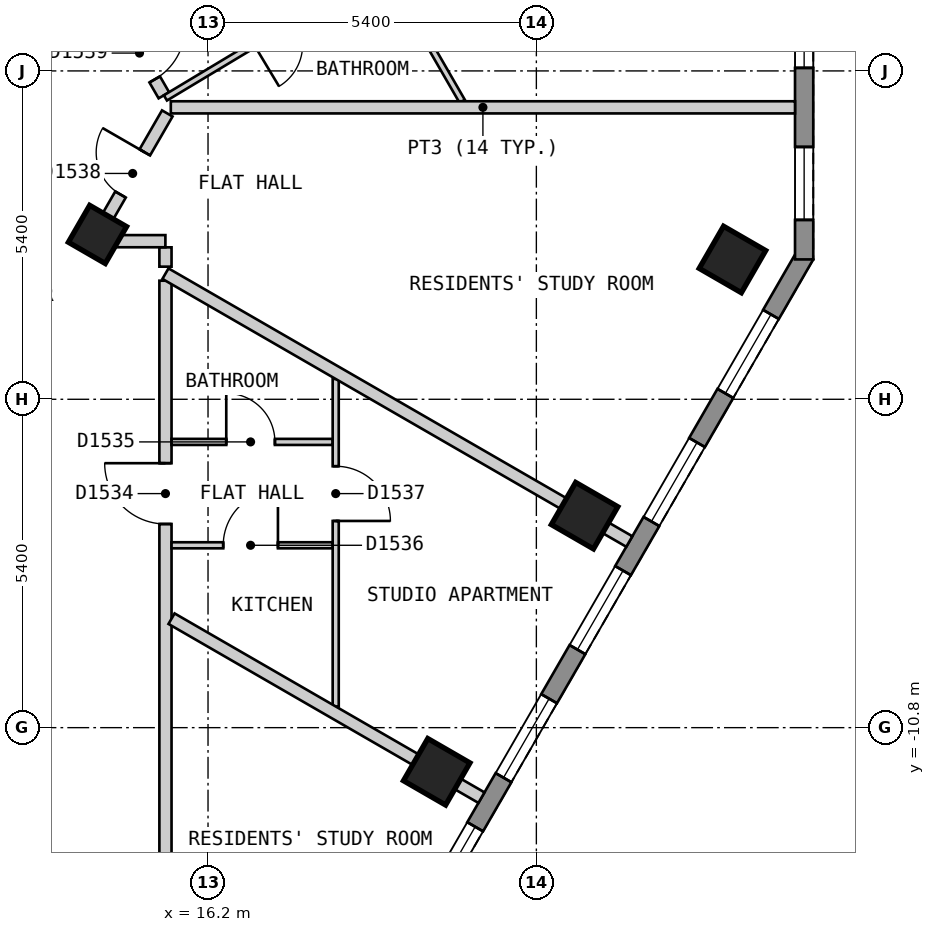
"""IFC4 building model, lengths in metres.
Left out: names, types, materials, properties, quantities, classifications, styles, units other than length and angle.
Written with IfcOpenShell. Run it as: python <this file> out.ifc"""

import sys

from ifc_helpers import new_model, si_unit, direction, frame, frame_2d, origin, origin_2d, place, context, subcontext, project, spatial, polyline, rectangle, outline, extrude, element, fill, save


model = new_model("IFC4")
c1 = context("Model", 3, precision=1e-05, world=origin(), true_north=direction((0.0, 1.0)))
c2 = subcontext(c1, "Body", "Model", "MODEL_VIEW")
j1 = project(units=[si_unit("LENGTHUNIT", "METRE"), si_unit("PLANEANGLEUNIT", "RADIAN")], contexts=[c1])
p1 = place(None, origin())
s1 = spatial("IfcSite", under=j1, at=p1, CompositionType="ELEMENT")
p2 = place(p1, origin())
s2 = spatial("IfcBuilding", under=s1, at=p2, CompositionType="ELEMENT")
p3 = place(p2, frame((0.0, 0.0, 184.2)))
s3 = spatial("IfcBuildingStorey", under=s2, at=p3, CompositionType="ELEMENT", Elevation=184.2)
for number, where, z_axis, x_axis in (
    (1, (19.961, -11.526, 0.0), (0.0, 0.0, 1.0), (0.5, 0.866, 0.0)),
    (2, (22.393, -7.314, 0.0), (0.0, 0.0, 1.0), (0.5, 0.866, 0.0)),
    (3, (24.825, -3.101, 0.0), (0.0, 0.0, 1.0), (0.5, 0.866, 0.0)),
):
    element("IfcColumn", number, at=place(p3, frame(where, z_axis=z_axis, x_axis=x_axis)), inside=s3, PredefinedType="COLUMN", context=c2, shape_type="SweptSolid", body=[
        extrude(rectangle(XDim=0.8, YDim=0.8, at=origin_2d()), origin(), (0.0, 0.0, 1.0), 3.0),
    ])
p4 = place(p3, frame((14.382, -2.689, 0.0), z_axis=(0.0, 0.0, 1.0), x_axis=(0.5, 0.866025403784, 0.0)))
e4 = element("IfcColumn", 4, at=p4, inside=s3, PredefinedType="COLUMN", context=c2, shape_type="SweptSolid", body=[
    extrude(rectangle(XDim=0.7, YDim=0.7, at=origin_2d()), origin(), (0.0, 0.0, 1.0), 3.0),
])
p5 = place(p3, frame((15.631, -21.025, 0.0), z_axis=(0.0, 0.0, 1.0), x_axis=(0.500018670445, 0.86601462413, 0.0)))
e5 = element("IfcWall", 5, at=p5, inside=s3, PredefinedType="SOLIDWALL", context=c2, shape_type="SweptSolid", body=[
    extrude(outline(polyline([(0.0, -0.15), (20.785, -0.15), (20.705, 0.15), (0.08, 0.15), (0.0, -0.15)])), origin(), (0.0, 0.0, 1.0), 2.7),
])
p6 = place(p5, frame((1.13, 0.0, 0.15)))
e6 = element("IfcOpeningElement", 6, at=p6, cuts=e5, PredefinedType="OPENING", context=c2, shape_type="SweptSolid", body=[
    extrude(rectangle(XDim=1.5, YDim=2.1, at=frame_2d((0.75, 1.05))), frame((0.0, 0.16, 0.0), z_axis=(0.0, -1.0, 0.0), x_axis=(1.0, 0.0, 0.0)), (0.0, 0.0, 1.0), 0.32),
])
p7 = place(p5, frame((3.562, 0.0, 0.15)))
e7 = element("IfcOpeningElement", 7, at=p7, cuts=e5, PredefinedType="OPENING", context=c2, shape_type="SweptSolid", body=[
    extrude(rectangle(XDim=1.5, YDim=2.1, at=frame_2d((0.75, 1.05))), frame((0.0, 0.16, 0.0), z_axis=(0.0, -1.0, 0.0), x_axis=(1.0, 0.0, 0.0)), (0.0, 0.0, 1.0), 0.32),
])
p8 = place(p5, frame((5.994, 0.0, 0.15)))
e8 = element("IfcOpeningElement", 8, at=p8, cuts=e5, PredefinedType="OPENING", context=c2, shape_type="SweptSolid", body=[
    extrude(rectangle(XDim=1.5, YDim=2.1, at=frame_2d((0.75, 1.05))), frame((0.0, 0.16, 0.0), z_axis=(0.0, -1.0, 0.0), x_axis=(1.0, 0.0, 0.0)), (0.0, 0.0, 1.0), 0.32),
])
p9 = place(p5, frame((8.425, 0.0, 0.15)))
e9 = element("IfcOpeningElement", 9, at=p9, cuts=e5, PredefinedType="OPENING", context=c2, shape_type="SweptSolid", body=[
    extrude(rectangle(XDim=1.5, YDim=2.1, at=frame_2d((0.75, 1.05))), frame((0.0, 0.16, 0.0), z_axis=(0.0, -1.0, 0.0), x_axis=(1.0, 0.0, 0.0)), (0.0, 0.0, 1.0), 0.32),
])
p10 = place(p5, frame((10.857, 0.0, 0.15)))
e10 = element("IfcOpeningElement", 10, at=p10, cuts=e5, PredefinedType="OPENING", context=c2, shape_type="SweptSolid", body=[
    extrude(rectangle(XDim=1.5, YDim=2.1, at=frame_2d((0.75, 1.05))), frame((0.0, 0.16, 0.0), z_axis=(0.0, -1.0, 0.0), x_axis=(1.0, 0.0, 0.0)), (0.0, 0.0, 1.0), 0.32),
])
p11 = place(p5, frame((13.289, 0.0, 0.15)))
e11 = element("IfcOpeningElement", 11, at=p11, cuts=e5, PredefinedType="OPENING", context=c2, shape_type="SweptSolid", body=[
    extrude(rectangle(XDim=1.5, YDim=2.1, at=frame_2d((0.75, 1.05))), frame((0.0, 0.16, 0.0), z_axis=(0.0, -1.0, 0.0), x_axis=(1.0, 0.0, 0.0)), (0.0, 0.0, 1.0), 0.32),
])
p12 = place(p5, frame((15.722, 0.0, 0.15)))
e12 = element("IfcOpeningElement", 12, at=p12, cuts=e5, PredefinedType="OPENING", context=c2, shape_type="SweptSolid", body=[
    extrude(rectangle(XDim=1.5, YDim=2.1, at=frame_2d((0.75, 1.05))), frame((0.0, 0.16, 0.0), z_axis=(0.0, -1.0, 0.0), x_axis=(1.0, 0.0, 0.0)), (0.0, 0.0, 1.0), 0.32),
])
p13 = place(p5, frame((18.154, 0.0, 0.15)))
e13 = element("IfcOpeningElement", 13, at=p13, cuts=e5, PredefinedType="OPENING", context=c2, shape_type="SweptSolid", body=[
    extrude(rectangle(XDim=1.5, YDim=2.1, at=frame_2d((0.75, 1.05))), frame((0.0, 0.16, 0.0), z_axis=(0.0, -1.0, 0.0), x_axis=(1.0, 0.0, 0.0)), (0.0, 0.0, 1.0), 0.32),
])
p14 = place(p3, frame((26.004, -3.1, 0.0), z_axis=(0.0, 0.0, 1.0), x_axis=(0.0, 1.0, 0.0)))
e14 = element("IfcWall", 14, at=p14, inside=s3, PredefinedType="SOLIDWALL", context=c2, shape_type="SweptSolid", body=[
    extrude(outline(polyline([(0.0, -0.15), (5.0, -0.15), (4.92, 0.15), (0.08, 0.15), (0.0, -0.15)])), origin(), (0.0, 0.0, 1.0), 2.7),
])
p15 = place(p14, frame((0.65, 0.0, 0.15)))
e15 = element("IfcOpeningElement", 15, at=p15, cuts=e14, PredefinedType="OPENING", context=c2, shape_type="SweptSolid", body=[
    extrude(rectangle(XDim=1.2, YDim=2.1, at=frame_2d((0.6, 1.05))), frame((0.0, 0.16, 0.0), z_axis=(0.0, -1.0, 0.0), x_axis=(1.0, 0.0, 0.0)), (0.0, 0.0, 1.0), 0.32),
])
p16 = place(p14, frame((3.15, 0.0, 0.15)))
e16 = element("IfcOpeningElement", 16, at=p16, cuts=e14, PredefinedType="OPENING", context=c2, shape_type="SweptSolid", body=[
    extrude(rectangle(XDim=1.2, YDim=2.1, at=frame_2d((0.6, 1.05))), frame((0.0, 0.16, 0.0), z_axis=(0.0, -1.0, 0.0), x_axis=(1.0, 0.0, 0.0)), (0.0, 0.0, 1.0), 0.32),
])
p17 = place(p3, frame((10.739, 7.8, 0.0), z_axis=(0.0, 0.0, 1.0), x_axis=(0.500023726918, -0.866011704609, 0.0)))
e17 = element("IfcWall", 17, at=p17, inside=s3, PredefinedType="PARTITIONING", context=c2, shape_type="SweptSolid", body=[
    extrude(rectangle(XDim=9.47, YDim=0.2, at=frame_2d((4.735, 0.0))), origin(), (0.0, 0.0, 1.0), 2.7),
])
p18 = place(p17, frame((8.168, 0.0, 0.0)))
e18 = element("IfcOpeningElement", 18, at=p18, cuts=e17, PredefinedType="OPENING", context=c2, shape_type="SweptSolid", body=[
    extrude(rectangle(XDim=1.0, YDim=2.1, at=frame_2d((0.5, 1.05))), frame((0.0, 0.11, 0.0), z_axis=(0.0, -1.0, 0.0), x_axis=(1.0, 0.0, 0.0)), (0.0, 0.0, 1.0), 0.22),
])
p19 = place(p17, frame((3.578, 0.0, 0.0)))
e19 = element("IfcOpeningElement", 19, at=p19, cuts=e17, PredefinedType="OPENING", context=c2, shape_type="SweptSolid", body=[
    extrude(rectangle(XDim=1.0, YDim=2.1, at=frame_2d((0.5, 1.05))), frame((0.0, 0.11, 0.0), z_axis=(0.0, -1.0, 0.0), x_axis=(1.0, 0.0, 0.0)), (0.0, 0.0, 1.0), 0.22),
])
p20 = place(p3, frame((15.5, -2.901, 0.0), z_axis=(0.0, 0.0, 1.0), x_axis=(0.0, -1.0, 0.0)))
e20 = element("IfcWall", 20, at=p20, inside=s3, PredefinedType="PARTITIONING", context=c2, shape_type="SweptSolid", body=[
    extrude(rectangle(XDim=0.318, YDim=0.2, at=frame_2d((0.159, 0.0))), origin(), (0.0, 0.0, 1.0), 2.7),
])
p21 = place(p3, frame((14.433, -2.8, 0.0), z_axis=(0.0, 0.0, 1.0), x_axis=(1.0, 0.0, 0.0)))
e21 = element("IfcWall", 21, at=p21, inside=s3, PredefinedType="PARTITIONING", context=c2, shape_type="SweptSolid", body=[
    extrude(rectangle(XDim=1.066, YDim=0.2, at=frame_2d((0.533, 0.0))), origin(), (0.0, 0.0, 1.0), 2.7),
])
p22 = place(p3, frame((14.318, -2.8, 0.0), z_axis=(0.0, 0.0, 1.0), x_axis=(0.49964693309, 0.866229151122, 0.0)))
e22 = element("IfcWall", 22, at=p22, inside=s3, PredefinedType="PARTITIONING", context=c2, shape_type="SweptSolid", body=[
    extrude(rectangle(XDim=2.426, YDim=0.2, at=frame_2d((1.213, 0.0))), origin(), (0.0, 0.0, 1.0), 2.7),
])
p23 = place(p22, frame((0.886, 0.0, 0.0)))
e23 = element("IfcOpeningElement", 23, at=p23, cuts=e22, PredefinedType="OPENING", context=c2, shape_type="SweptSolid", body=[
    extrude(rectangle(XDim=0.8, YDim=2.1, at=frame_2d((0.4, 1.05))), frame((0.0, 0.11, 0.0), z_axis=(0.0, -1.0, 0.0), x_axis=(1.0, 0.0, 0.0)), (0.0, 0.0, 1.0), 0.22),
])
p24 = place(p3, frame((15.5, -18.799, 0.0), z_axis=(0.0, 0.0, 1.0), x_axis=(0.0, 1.0, 0.0)))
e24 = element("IfcWall", 24, at=p24, inside=s3, PredefinedType="PARTITIONING", context=c2, shape_type="SweptSolid", body=[
    extrude(rectangle(XDim=15.349, YDim=0.2, at=frame_2d((7.675, 0.0))), origin(), (0.0, 0.0, 1.0), 2.7),
])
p25 = place(p24, frame((4.477, 0.0, 0.0)))
e25 = element("IfcOpeningElement", 25, at=p25, cuts=e24, PredefinedType="OPENING", context=c2, shape_type="SweptSolid", body=[
    extrude(rectangle(XDim=0.8, YDim=2.1, at=frame_2d((0.4, 1.05))), frame((0.0, 0.11, 0.0), z_axis=(0.0, -1.0, 0.0), x_axis=(1.0, 0.0, 0.0)), (0.0, 0.0, 1.0), 0.22),
])
p26 = place(p24, frame((11.348, 0.0, 0.0)))
e26 = element("IfcOpeningElement", 26, at=p26, cuts=e24, PredefinedType="OPENING", context=c2, shape_type="SweptSolid", body=[
    extrude(rectangle(XDim=1.0, YDim=2.1, at=frame_2d((0.5, 1.05))), frame((0.0, 0.11, 0.0), z_axis=(0.0, -1.0, 0.0), x_axis=(1.0, 0.0, 0.0)), (0.0, 0.0, 1.0), 0.22),
])
p27 = place(p3, frame((19.75, 0.592, 0.0), z_axis=(0.0, 0.0, 1.0), x_axis=(0.499974077718, -0.866040369504, 0.0)))
e27 = element("IfcWall", 27, at=p27, inside=s3, PredefinedType="PARTITIONING", context=c2, shape_type="SweptSolid", body=[
    extrude(rectangle(XDim=1.26, YDim=0.1, at=frame_2d((0.63, 0.0))), origin(), (0.0, 0.0, 1.0), 2.7),
])
p28 = place(p3, frame((15.6, -6.101, 0.0), z_axis=(0.0, 0.0, 1.0), x_axis=(1.0, 0.0, 0.0)))
e28 = element("IfcWall", 28, at=p28, inside=s3, PredefinedType="PARTITIONING", context=c2, shape_type="SweptSolid", body=[
    extrude(rectangle(XDim=2.65, YDim=0.1, at=frame_2d((1.325, 0.0))), origin(), (0.0, 0.0, 1.0), 2.7),
])
p29 = place(p28, frame((0.9, 0.0, 0.0)))
e29 = element("IfcOpeningElement", 29, at=p29, cuts=e28, PredefinedType="OPENING", context=c2, shape_type="SweptSolid", body=[
    extrude(rectangle(XDim=0.8, YDim=2.1, at=frame_2d((0.4, 1.05))), frame((0.0, 0.06, 0.0), z_axis=(0.0, -1.0, 0.0), x_axis=(1.0, 0.0, 0.0)), (0.0, 0.0, 1.0), 0.12),
])
p30 = place(p3, frame((15.6, -7.801, 0.0), z_axis=(0.0, 0.0, 1.0), x_axis=(1.0, 0.0, 0.0)))
e30 = element("IfcWall", 30, at=p30, inside=s3, PredefinedType="PARTITIONING", context=c2, shape_type="SweptSolid", body=[
    extrude(rectangle(XDim=2.65, YDim=0.1, at=frame_2d((1.325, 0.0))), origin(), (0.0, 0.0, 1.0), 2.7),
])
p31 = place(p30, frame((0.85, 0.0, 0.0)))
e31 = element("IfcOpeningElement", 31, at=p31, cuts=e30, PredefinedType="OPENING", context=c2, shape_type="SweptSolid", body=[
    extrude(rectangle(XDim=0.9, YDim=2.1, at=frame_2d((0.45, 1.05))), frame((0.0, 0.06, 0.0), z_axis=(0.0, -1.0, 0.0), x_axis=(1.0, 0.0, 0.0)), (0.0, 0.0, 1.0), 0.12),
])
p32 = place(p3, frame((18.3, -10.452, 0.0), z_axis=(0.0, 0.0, 1.0), x_axis=(0.0, 1.0, 0.0)))
e32 = element("IfcWall", 32, at=p32, inside=s3, PredefinedType="PARTITIONING", context=c2, shape_type="SweptSolid", body=[
    extrude(rectangle(XDim=5.386, YDim=0.1, at=frame_2d((2.693, 0.0))), origin(), (0.0, 0.0, 1.0), 2.7),
])
p33 = place(p32, frame((3.051, 0.0, 0.0)))
e33 = element("IfcOpeningElement", 33, at=p33, cuts=e32, PredefinedType="OPENING", context=c2, shape_type="SweptSolid", body=[
    extrude(rectangle(XDim=0.9, YDim=2.1, at=frame_2d((0.45, 1.05))), frame((0.0, 0.06, 0.0), z_axis=(0.0, -1.0, 0.0), x_axis=(1.0, 0.0, 0.0)), (0.0, 0.0, 1.0), 0.12),
])
p34 = place(p3, frame((15.499, -0.444, 0.0), z_axis=(0.0, 0.0, 1.0), x_axis=(0.857061798163, 0.515213619899, 0.0)))
e34 = element("IfcWall", 34, at=p34, inside=s3, PredefinedType="PARTITIONING", context=c2, shape_type="SweptSolid", body=[
    extrude(rectangle(XDim=4.15, YDim=0.1, at=frame_2d((2.075, 0.0))), origin(), (0.0, 0.0, 1.0), 2.7),
])
p35 = place(p34, frame((1.7, 0.0, 0.0)))
e35 = element("IfcOpeningElement", 35, at=p35, cuts=e34, PredefinedType="OPENING", context=c2, shape_type="SweptSolid", body=[
    extrude(rectangle(XDim=0.8, YDim=2.1, at=frame_2d((0.4, 1.05))), frame((0.0, 0.06, 0.0), z_axis=(0.0, -1.0, 0.0), x_axis=(1.0, 0.0, 0.0)), (0.0, 0.0, 1.0), 0.12),
])
p36 = place(p3, frame((15.6, -9.008, 0.0), z_axis=(0.0, 0.0, 1.0), x_axis=(0.866013576751, -0.500020484464, 0.0)))
e36 = element("IfcWall", 36, at=p36, inside=s3, PredefinedType="PARTITIONING", context=c2, shape_type="SweptSolid", body=[
    extrude(rectangle(XDim=5.885, YDim=0.2, at=frame_2d((2.943, 0.0))), origin(), (0.0, 0.0, 1.0), 2.7),
])
p37 = place(p3, frame((15.5, -3.334, 0.0), z_axis=(0.0, 0.0, 1.0), x_axis=(0.866001896501, -0.5000407136, 0.0)))
e37 = element("IfcWall", 37, at=p37, inside=s3, PredefinedType="PARTITIONING", context=c2, shape_type="SweptSolid", body=[
    extrude(rectangle(XDim=8.809, YDim=0.2, at=frame_2d((4.405, 0.0))), origin(), (0.0, 0.0, 1.0), 2.7),
])
p38 = place(p3, frame((15.588, -0.599, 0.0), z_axis=(0.0, 0.0, 1.0), x_axis=(1.0, 0.0, 0.0)))
e38 = element("IfcWall", 38, at=p38, inside=s3, PredefinedType="PARTITIONING", context=c2, shape_type="SweptSolid", body=[
    extrude(rectangle(XDim=10.266, YDim=0.2, at=frame_2d((5.133, 0.0))), origin(), (0.0, 0.0, 1.0), 2.7),
])
p39 = place(p9, origin())
e39 = element("IfcWindow", 39, at=p39, inside=s3, PartitioningType="SINGLE_PANEL", PredefinedType="WINDOW", context=c2, shape_type="SweptSolid", body=[
    extrude(rectangle(XDim=1.5, YDim=2.1, at=frame_2d((0.75, 1.05))), frame((0.0, 0.03, 0.0), z_axis=(0.0, -1.0, 0.0), x_axis=(1.0, 0.0, 0.0)), (0.0, 0.0, 1.0), 0.06),
])
fill(e9, e39)
p40 = place(p10, origin())
e40 = element("IfcWindow", 40, at=p40, inside=s3, PartitioningType="SINGLE_PANEL", PredefinedType="WINDOW", context=c2, shape_type="SweptSolid", body=[
    extrude(rectangle(XDim=1.5, YDim=2.1, at=frame_2d((0.75, 1.05))), frame((0.0, 0.03, 0.0), z_axis=(0.0, -1.0, 0.0), x_axis=(1.0, 0.0, 0.0)), (0.0, 0.0, 1.0), 0.06),
])
fill(e10, e40)
p41 = place(p11, origin())
e41 = element("IfcWindow", 41, at=p41, inside=s3, PartitioningType="SINGLE_PANEL", PredefinedType="WINDOW", context=c2, shape_type="SweptSolid", body=[
    extrude(rectangle(XDim=1.5, YDim=2.1, at=frame_2d((0.75, 1.05))), frame((0.0, 0.03, 0.0), z_axis=(0.0, -1.0, 0.0), x_axis=(1.0, 0.0, 0.0)), (0.0, 0.0, 1.0), 0.06),
])
fill(e11, e41)
p42 = place(p12, origin())
e42 = element("IfcWindow", 42, at=p42, inside=s3, PartitioningType="SINGLE_PANEL", PredefinedType="WINDOW", context=c2, shape_type="SweptSolid", body=[
    extrude(rectangle(XDim=1.5, YDim=2.1, at=frame_2d((0.75, 1.05))), frame((0.0, 0.03, 0.0), z_axis=(0.0, -1.0, 0.0), x_axis=(1.0, 0.0, 0.0)), (0.0, 0.0, 1.0), 0.06),
])
fill(e12, e42)
p43 = place(p13, origin())
e43 = element("IfcWindow", 43, at=p43, inside=s3, PartitioningType="SINGLE_PANEL", PredefinedType="WINDOW", context=c2, shape_type="SweptSolid", body=[
    extrude(rectangle(XDim=1.5, YDim=2.1, at=frame_2d((0.75, 1.05))), frame((0.0, 0.03, 0.0), z_axis=(0.0, -1.0, 0.0), x_axis=(1.0, 0.0, 0.0)), (0.0, 0.0, 1.0), 0.06),
])
fill(e13, e43)
p44 = place(p15, origin())
e44 = element("IfcWindow", 44, at=p44, inside=s3, PartitioningType="SINGLE_PANEL", PredefinedType="WINDOW", context=c2, shape_type="SweptSolid", body=[
    extrude(rectangle(XDim=1.2, YDim=2.1, at=frame_2d((0.6, 1.05))), frame((0.0, 0.03, 0.0), z_axis=(0.0, -1.0, 0.0), x_axis=(1.0, 0.0, 0.0)), (0.0, 0.0, 1.0), 0.06),
])
fill(e15, e44)
p45 = place(p16, origin())
e45 = element("IfcWindow", 45, at=p45, inside=s3, PartitioningType="SINGLE_PANEL", PredefinedType="WINDOW", context=c2, shape_type="SweptSolid", body=[
    extrude(rectangle(XDim=1.2, YDim=2.1, at=frame_2d((0.6, 1.05))), frame((0.0, 0.03, 0.0), z_axis=(0.0, -1.0, 0.0), x_axis=(1.0, 0.0, 0.0)), (0.0, 0.0, 1.0), 0.06),
])
fill(e16, e45)
p46 = place(p26, origin())
e46 = element("IfcDoor", 46, at=p46, inside=s3, OperationType="SINGLE_SWING_RIGHT", PredefinedType="DOOR", context=c2, shape_type="SweptSolid", body=[
    extrude(rectangle(XDim=1.0, YDim=2.1, at=frame_2d((0.5, 1.05))), frame((0.0, 0.025, 0.0), z_axis=(0.0, -1.0, 0.0), x_axis=(1.0, 0.0, 0.0)), (0.0, 0.0, 1.0), 0.05),
])
fill(e26, e46)
p47 = place(p29, origin())
e47 = element("IfcDoor", 47, at=p47, inside=s3, OperationType="SINGLE_SWING_LEFT", PredefinedType="DOOR", context=c2, shape_type="SweptSolid", body=[
    extrude(rectangle(XDim=0.8, YDim=2.1, at=frame_2d((0.4, 1.05))), frame((0.0, 0.025, 0.0), z_axis=(0.0, -1.0, 0.0), x_axis=(1.0, 0.0, 0.0)), (0.0, 0.0, 1.0), 0.05),
])
fill(e29, e47)
p48 = place(p31, origin())
e48 = element("IfcDoor", 48, at=p48, inside=s3, OperationType="SINGLE_SWING_RIGHT", PredefinedType="DOOR", context=c2, shape_type="SweptSolid", body=[
    extrude(rectangle(XDim=0.9, YDim=2.1, at=frame_2d((0.45, 1.05))), frame((0.0, 0.025, 0.0), z_axis=(0.0, -1.0, 0.0), x_axis=(1.0, 0.0, 0.0)), (0.0, 0.0, 1.0), 0.05),
])
fill(e31, e48)
p49 = place(p33, origin())
e49 = element("IfcDoor", 49, at=p49, inside=s3, OperationType="SINGLE_SWING_LEFT", PredefinedType="DOOR", context=c2, shape_type="SweptSolid", body=[
    extrude(rectangle(XDim=0.9, YDim=2.1, at=frame_2d((0.45, 1.05))), frame((0.0, 0.025, 0.0), z_axis=(0.0, -1.0, 0.0), x_axis=(1.0, 0.0, 0.0)), (0.0, 0.0, 1.0), 0.05),
])
fill(e33, e49)
p50 = place(p23, origin())
e50 = element("IfcDoor", 50, at=p50, inside=s3, OperationType="SINGLE_SWING_RIGHT", PredefinedType="DOOR", context=c2, shape_type="SweptSolid", body=[
    extrude(rectangle(XDim=0.8, YDim=2.1, at=frame_2d((0.4, 1.05))), frame((0.0, 0.025, 0.0), z_axis=(0.0, -1.0, 0.0), x_axis=(1.0, 0.0, 0.0)), (0.0, 0.0, 1.0), 0.05),
])
fill(e23, e50)
p51 = place(p18, origin())
e51 = element("IfcDoor", 51, at=p51, inside=s3, OperationType="SINGLE_SWING_LEFT", PredefinedType="DOOR", context=c2, shape_type="SweptSolid", body=[
    extrude(rectangle(XDim=1.0, YDim=2.1, at=frame_2d((0.5, 1.05))), frame((0.0, 0.025, 0.0), z_axis=(0.0, -1.0, 0.0), x_axis=(1.0, 0.0, 0.0)), (0.0, 0.0, 1.0), 0.05),
])
fill(e18, e51)
save(model, sys.argv[1])
